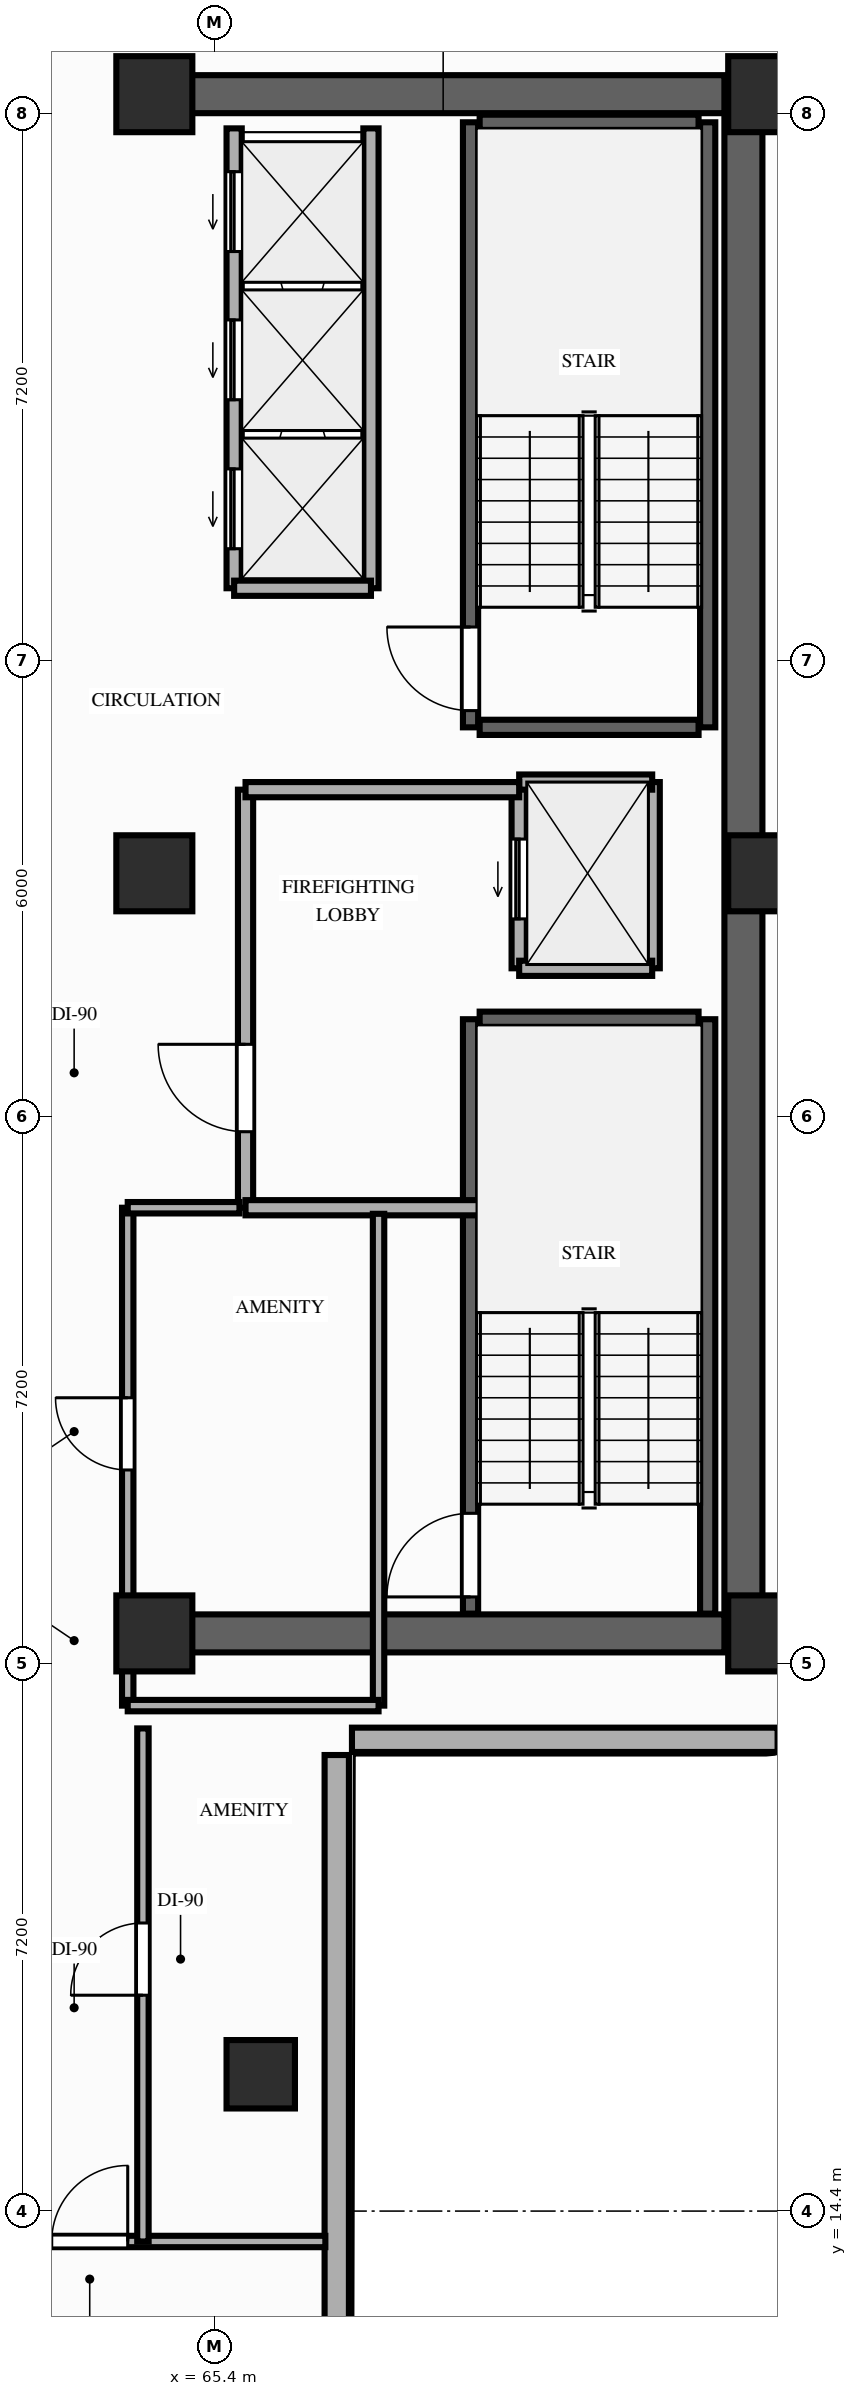
"""IFC4 building model, lengths in metres.
Left out: names, types, materials, properties, quantities, classifications, styles, units other than length and angle.
Written with IfcOpenShell. Run it as: python <this file> out.ifc"""

import sys

from ifc_helpers import new_model, si_unit, direction, frame, frame_2d, origin, origin_2d, place, context, subcontext, project, spatial, rectangle, extrude, element, fill, save


model = new_model("IFC4")
c1 = context("Model", 3, precision=1e-05, world=origin(), true_north=direction((0.0, 1.0)))
c2 = subcontext(c1, "Body", "Model", "MODEL_VIEW")
j1 = project(units=[si_unit("LENGTHUNIT", "METRE"), si_unit("PLANEANGLEUNIT", "RADIAN")], contexts=[c1])
p1 = place(None, origin())
s1 = spatial("IfcSite", under=j1, at=p1, CompositionType="ELEMENT")
p2 = place(p1, origin())
s2 = spatial("IfcBuilding", under=s1, at=p2, CompositionType="ELEMENT")
p3 = place(p2, frame((0.0, 0.0, 62.8)))
s3 = spatial("IfcBuildingStorey", under=s2, at=p3, CompositionType="ELEMENT", Elevation=62.8)
for number, where, z_axis, x_axis in (
    (1, (64.6, 22.0, 0.0), (0.0, 0.0, 1.0), (1.0, 0.0, 0.0)),
    (2, (72.65, 22.0, 0.0), (0.0, 0.0, 1.0), (1.0, 0.0, 0.0)),
    (3, (64.6, 32.0, 0.0), (0.0, 0.0, 1.0), (1.0, 0.0, 0.0)),
    (4, (72.65, 32.0, 0.0), (0.0, 0.0, 1.0), (1.0, 0.0, 0.0)),
    (5, (64.6, 42.25, 0.0), (0.0, 0.0, 1.0), (1.0, 0.0, 0.0)),
    (6, (72.65, 42.25, 0.0), (0.0, 0.0, 1.0), (1.0, 0.0, 0.0)),
):
    element("IfcColumn", number, at=place(p3, frame(where, z_axis=z_axis, x_axis=x_axis)), inside=s3, PredefinedType="COLUMN", context=c2, shape_type="SweptSolid", body=[
        extrude(rectangle(XDim=1.0, YDim=1.0, at=origin_2d()), origin(), (0.0, 0.0, 1.0), 3.2),
    ])
p4 = place(p3, frame((66.0, 16.2, 0.0), z_axis=(0.0, 0.0, 1.0), x_axis=(1.0, 0.0, 0.0)))
e7 = element("IfcColumn", 7, at=p4, inside=s3, PredefinedType="COLUMN", context=c2, shape_type="SweptSolid", body=[
    extrude(rectangle(XDim=0.9, YDim=0.9, at=origin_2d()), origin(), (0.0, 0.0, 1.0), 3.2),
])
p5 = place(p3, frame((67.0, 7.6, 0.0), z_axis=(0.0, 0.0, 1.0), x_axis=(0.0, 1.0, 0.0)))
e8 = element("IfcWall", 8, at=p5, inside=s3, PredefinedType="STANDARD", context=c2, shape_type="SweptSolid", body=[
    extrude(rectangle(XDim=12.8, YDim=0.32, at=frame_2d((6.4, 0.0))), origin(), (0.0, 0.0, 1.0), 3.02),
])
p6 = place(p3, frame((67.2, 20.6, 0.0), z_axis=(0.0, 0.0, 1.0), x_axis=(1.0, 0.0, 0.0)))
e9 = element("IfcWall", 9, at=p6, inside=s3, PredefinedType="STANDARD", context=c2, shape_type="SweptSolid", body=[
    extrude(rectangle(XDim=5.6, YDim=0.32, at=frame_2d((2.8, 0.0))), origin(), (0.0, 0.0, 1.0), 3.02),
])
p7 = place(p3, frame((72.35, 22.0, 0.0), z_axis=(0.0, 0.0, 1.0), x_axis=(0.0, 1.0, 0.0)))
e10 = element("IfcWall", 10, at=p7, inside=s3, PredefinedType="SHEAR", context=c2, shape_type="SweptSolid", body=[
    extrude(rectangle(XDim=20.25, YDim=0.5, at=frame_2d((10.125, 0.0))), origin(), (0.0, 0.0, 1.0), 3.02),
])
for number, where, z_axis, x_axis in (
    (11, (64.6, 42.25, 0.0), (0.0, 0.0, 1.0), (1.0, 0.0, 0.0)),
    (12, (64.6, 22.0, 0.0), (0.0, 0.0, 1.0), (1.0, 0.0, 0.0)),
):
    element("IfcWall", number, at=place(p3, frame(where, z_axis=z_axis, x_axis=x_axis)), inside=s3, PredefinedType="SHEAR", context=c2, shape_type="SweptSolid", body=[
        extrude(rectangle(XDim=7.5, YDim=0.5, at=frame_2d((3.75, 0.0))), origin(), (0.0, 0.0, 1.0), 3.02),
    ])
p8 = place(p3, frame((68.76, 22.26, 0.0), z_axis=(0.0, 0.0, 1.0), x_axis=(0.0, 1.0, 0.0)))
e13 = element("IfcWall", 13, at=p8, inside=s3, PredefinedType="SHEAR", context=c2, shape_type="SweptSolid", body=[
    extrude(rectangle(XDim=7.82, YDim=0.2, at=frame_2d((3.91, 0.0))), origin(), (0.0, 0.0, 1.0), 3.02),
])
p9 = place(p8, frame((0.22, 0.0, 0.0)))
e14 = element("IfcOpeningElement", 14, at=p9, cuts=e13, PredefinedType="OPENING", context=c2, shape_type="SweptSolid", body=[
    extrude(rectangle(XDim=1.1, YDim=2.15, at=frame_2d((0.55, 1.075))), frame((0.0, 0.11, 0.0), z_axis=(0.0, -1.0, 0.0), x_axis=(1.0, 0.0, 0.0)), (0.0, 0.0, 1.0), 0.22),
])
p10 = place(p3, frame((71.88, 22.26, 0.0), z_axis=(0.0, 0.0, 1.0), x_axis=(0.0, 1.0, 0.0)))
e15 = element("IfcWall", 15, at=p10, inside=s3, PredefinedType="SHEAR", context=c2, shape_type="SweptSolid", body=[
    extrude(rectangle(XDim=7.82, YDim=0.2, at=frame_2d((3.91, 0.0))), origin(), (0.0, 0.0, 1.0), 3.02),
])
p11 = place(p3, frame((68.88, 30.08, 0.0), z_axis=(0.0, 0.0, 1.0), x_axis=(1.0, 0.0, 0.0)))
e16 = element("IfcWall", 16, at=p11, inside=s3, PredefinedType="SHEAR", context=c2, shape_type="SweptSolid", body=[
    extrude(rectangle(XDim=2.88, YDim=0.2, at=frame_2d((1.44, 0.0))), origin(), (0.0, 0.0, 1.0), 3.02),
])
p12 = place(p3, frame((68.76, 33.92, 0.0), z_axis=(0.0, 0.0, 1.0), x_axis=(0.0, 1.0, 0.0)))
e17 = element("IfcWall", 17, at=p12, inside=s3, PredefinedType="SHEAR", context=c2, shape_type="SweptSolid", body=[
    extrude(rectangle(XDim=7.96, YDim=0.2, at=frame_2d((3.98, 0.0))), origin(), (0.0, 0.0, 1.0), 3.02),
])
p13 = place(p12, frame((0.22, 0.0, 0.0)))
e18 = element("IfcOpeningElement", 18, at=p13, cuts=e17, PredefinedType="OPENING", context=c2, shape_type="SweptSolid", body=[
    extrude(rectangle(XDim=1.1, YDim=2.15, at=frame_2d((0.55, 1.075))), frame((0.0, 0.11, 0.0), z_axis=(0.0, -1.0, 0.0), x_axis=(1.0, 0.0, 0.0)), (0.0, 0.0, 1.0), 0.22),
])
p14 = place(p3, frame((71.88, 33.92, 0.0), z_axis=(0.0, 0.0, 1.0), x_axis=(0.0, 1.0, 0.0)))
e19 = element("IfcWall", 19, at=p14, inside=s3, PredefinedType="SHEAR", context=c2, shape_type="SweptSolid", body=[
    extrude(rectangle(XDim=7.96, YDim=0.2, at=frame_2d((3.98, 0.0))), origin(), (0.0, 0.0, 1.0), 3.02),
])
for number, where, z_axis, x_axis in (
    (20, (68.88, 41.88, 0.0), (0.0, 0.0, 1.0), (1.0, 0.0, 0.0)),
    (21, (68.88, 33.92, 0.0), (0.0, 0.0, 1.0), (1.0, 0.0, 0.0)),
):
    element("IfcWall", number, at=place(p3, frame(where, z_axis=z_axis, x_axis=x_axis)), inside=s3, PredefinedType="SHEAR", context=c2, shape_type="SweptSolid", body=[
        extrude(rectangle(XDim=2.88, YDim=0.2, at=frame_2d((1.44, 0.0))), origin(), (0.0, 0.0, 1.0), 3.02),
    ])
p15 = place(p3, frame((65.65, 35.75, 0.0), z_axis=(0.0, 0.0, 1.0), x_axis=(0.0, 1.0, 0.0)))
e22 = element("IfcWall", 22, at=p15, inside=s3, PredefinedType="MOVABLE", context=c2, shape_type="SweptSolid", body=[
    extrude(rectangle(XDim=6.05, YDim=0.2, at=frame_2d((3.025, 0.0))), origin(), (0.0, 0.0, 1.0), 3.02),
])
p16 = place(p15, frame((0.52, 0.0, 0.0)))
e23 = element("IfcOpeningElement", 23, at=p16, cuts=e22, PredefinedType="OPENING", context=c2, shape_type="SweptSolid", body=[
    extrude(rectangle(XDim=1.05, YDim=2.15, at=frame_2d((0.525, 1.075))), frame((0.0, 0.11, 0.0), z_axis=(0.0, -1.0, 0.0), x_axis=(1.0, 0.0, 0.0)), (0.0, 0.0, 1.0), 0.22),
])
p17 = place(p15, frame((2.48, 0.0, 0.0)))
e24 = element("IfcOpeningElement", 24, at=p17, cuts=e22, PredefinedType="OPENING", context=c2, shape_type="SweptSolid", body=[
    extrude(rectangle(XDim=1.05, YDim=2.15, at=frame_2d((0.525, 1.075))), frame((0.0, 0.11, 0.0), z_axis=(0.0, -1.0, 0.0), x_axis=(1.0, 0.0, 0.0)), (0.0, 0.0, 1.0), 0.22),
])
p18 = place(p15, frame((4.43, 0.0, 0.0)))
e25 = element("IfcOpeningElement", 25, at=p18, cuts=e22, PredefinedType="OPENING", context=c2, shape_type="SweptSolid", body=[
    extrude(rectangle(XDim=1.05, YDim=2.15, at=frame_2d((0.525, 1.075))), frame((0.0, 0.11, 0.0), z_axis=(0.0, -1.0, 0.0), x_axis=(1.0, 0.0, 0.0)), (0.0, 0.0, 1.0), 0.22),
])
p19 = place(p3, frame((67.45, 35.75, 0.0), z_axis=(0.0, 0.0, 1.0), x_axis=(0.0, 1.0, 0.0)))
e26 = element("IfcWall", 26, at=p19, inside=s3, PredefinedType="MOVABLE", context=c2, shape_type="SweptSolid", body=[
    extrude(rectangle(XDim=6.05, YDim=0.2, at=frame_2d((3.025, 0.0))), origin(), (0.0, 0.0, 1.0), 3.02),
])
p20 = place(p3, frame((65.65, 35.75, 0.0), z_axis=(0.0, 0.0, 1.0), x_axis=(1.0, 0.0, 0.0)))
e27 = element("IfcWall", 27, at=p20, inside=s3, PredefinedType="MOVABLE", context=c2, shape_type="SweptSolid", body=[
    extrude(rectangle(XDim=1.8, YDim=0.2, at=frame_2d((0.9, 0.0))), origin(), (0.0, 0.0, 1.0), 3.02),
])
p21 = place(p3, frame((69.4, 30.75, 0.0), z_axis=(0.0, 0.0, 1.0), x_axis=(0.0, 1.0, 0.0)))
e28 = element("IfcWall", 28, at=p21, inside=s3, PredefinedType="MOVABLE", context=c2, shape_type="SweptSolid", body=[
    extrude(rectangle(XDim=2.45, YDim=0.2, at=frame_2d((1.225, 0.0))), origin(), (0.0, 0.0, 1.0), 3.02),
])
p22 = place(p21, frame((0.65, 0.0, 0.0)))
e29 = element("IfcOpeningElement", 29, at=p22, cuts=e28, PredefinedType="OPENING", context=c2, shape_type="SweptSolid", body=[
    extrude(rectangle(XDim=1.05, YDim=2.15, at=frame_2d((0.525, 1.075))), frame((0.0, 0.11, 0.0), z_axis=(0.0, -1.0, 0.0), x_axis=(1.0, 0.0, 0.0)), (0.0, 0.0, 1.0), 0.22),
])
p23 = place(p3, frame((71.15, 30.75, 0.0), z_axis=(0.0, 0.0, 1.0), x_axis=(0.0, 1.0, 0.0)))
e30 = element("IfcWall", 30, at=p23, inside=s3, PredefinedType="MOVABLE", context=c2, shape_type="SweptSolid", body=[
    extrude(rectangle(XDim=2.45, YDim=0.2, at=frame_2d((1.225, 0.0))), origin(), (0.0, 0.0, 1.0), 3.02),
])
for number, where, z_axis, x_axis in (
    (31, (69.4, 33.2, 0.0), (0.0, 0.0, 1.0), (1.0, 0.0, 0.0)),
    (32, (69.4, 30.75, 0.0), (0.0, 0.0, 1.0), (1.0, 0.0, 0.0)),
):
    element("IfcWall", number, at=place(p3, frame(where, z_axis=z_axis, x_axis=x_axis)), inside=s3, PredefinedType="MOVABLE", context=c2, shape_type="SweptSolid", body=[
        extrude(rectangle(XDim=1.75, YDim=0.2, at=frame_2d((0.875, 0.0))), origin(), (0.0, 0.0, 1.0), 3.02),
    ])
p24 = place(p3, frame((65.8, 27.6, 0.0), z_axis=(0.0, 0.0, 1.0), x_axis=(0.0, 1.0, 0.0)))
e33 = element("IfcWall", 33, at=p24, inside=s3, PredefinedType="PARTITIONING", context=c2, shape_type="SweptSolid", body=[
    extrude(rectangle(XDim=5.5, YDim=0.2, at=frame_2d((2.75, 0.0))), origin(), (0.0, 0.0, 1.0), 3.02),
])
p25 = place(p24, frame((1.0, 0.0, 0.0)))
e34 = element("IfcOpeningElement", 34, at=p25, cuts=e33, PredefinedType="OPENING", context=c2, shape_type="SweptSolid", body=[
    extrude(rectangle(XDim=1.15, YDim=2.15, at=frame_2d((0.575, 1.075))), frame((0.0, 0.11, 0.0), z_axis=(0.0, -1.0, 0.0), x_axis=(1.0, 0.0, 0.0)), (0.0, 0.0, 1.0), 0.22),
])
p26 = place(p3, frame((65.8, 33.1, 0.0), z_axis=(0.0, 0.0, 1.0), x_axis=(1.0, 0.0, 0.0)))
e35 = element("IfcWall", 35, at=p26, inside=s3, PredefinedType="PARTITIONING", context=c2, shape_type="SweptSolid", body=[
    extrude(rectangle(XDim=3.6, YDim=0.2, at=frame_2d((1.8, 0.0))), origin(), (0.0, 0.0, 1.0), 3.02),
])
p27 = place(p3, frame((65.8, 27.6, 0.0), z_axis=(0.0, 0.0, 1.0), x_axis=(1.0, 0.0, 0.0)))
e36 = element("IfcWall", 36, at=p27, inside=s3, PredefinedType="PARTITIONING", context=c2, shape_type="SweptSolid", body=[
    extrude(rectangle(XDim=3.4, YDim=0.2, at=frame_2d((1.7, 0.0))), origin(), (0.0, 0.0, 1.0), 3.02),
])
p28 = place(p3, frame((64.25, 21.05, 0.0), z_axis=(0.0, 0.0, 1.0), x_axis=(0.0, 1.0, 0.0)))
e37 = element("IfcWall", 37, at=p28, inside=s3, PredefinedType="PARTITIONING", context=c2, shape_type="SweptSolid", body=[
    extrude(rectangle(XDim=6.55, YDim=0.15, at=frame_2d((3.275, 0.0))), origin(), (0.0, 0.0, 1.0), 2.5),
])
p29 = place(p28, frame((3.1, 0.0, 0.0)))
e38 = element("IfcOpeningElement", 38, at=p29, cuts=e37, PredefinedType="OPENING", context=c2, shape_type="SweptSolid", body=[
    extrude(rectangle(XDim=0.95, YDim=2.15, at=frame_2d((0.475, 1.075))), frame((0.0, 0.085, 0.0), z_axis=(0.0, -1.0, 0.0), x_axis=(1.0, 0.0, 0.0)), (0.0, 0.0, 1.0), 0.17),
])
p30 = place(p3, frame((67.55, 21.05, 0.0), z_axis=(0.0, 0.0, 1.0), x_axis=(0.0, 1.0, 0.0)))
e39 = element("IfcWall", 39, at=p30, inside=s3, PredefinedType="PARTITIONING", context=c2, shape_type="SweptSolid", body=[
    extrude(rectangle(XDim=6.47, YDim=0.15, at=frame_2d((3.235, 0.0))), origin(), (0.0, 0.0, 1.0), 2.5),
])
p31 = place(p3, frame((64.25, 21.05, 0.0), z_axis=(0.0, 0.0, 1.0), x_axis=(1.0, 0.0, 0.0)))
e40 = element("IfcWall", 40, at=p31, inside=s3, PredefinedType="PARTITIONING", context=c2, shape_type="SweptSolid", body=[
    extrude(rectangle(XDim=3.3, YDim=0.15, at=frame_2d((1.65, 0.0))), origin(), (0.0, 0.0, 1.0), 2.5),
])
p32 = place(p3, frame((64.25, 27.6, 0.0), z_axis=(0.0, 0.0, 1.0), x_axis=(1.0, 0.0, 0.0)))
e41 = element("IfcWall", 41, at=p32, inside=s3, PredefinedType="PARTITIONING", context=c2, shape_type="SweptSolid", body=[
    extrude(rectangle(XDim=1.47, YDim=0.15, at=frame_2d((0.735, 0.0))), origin(), (0.0, 0.0, 1.0), 2.5),
])
p33 = place(p3, frame((55.55, 14.0, 0.0), z_axis=(0.0, 0.0, 1.0), x_axis=(1.0, 0.0, 0.0)))
e42 = element("IfcWall", 42, at=p33, inside=s3, PredefinedType="PARTITIONING", context=c2, shape_type="SweptSolid", body=[
    extrude(rectangle(XDim=11.3, YDim=0.15, at=frame_2d((5.65, 0.0))), origin(), (0.0, 0.0, 1.0), 2.5),
])
p34 = place(p33, frame((7.7, 0.0, 0.0)))
e43 = element("IfcOpeningElement", 43, at=p34, cuts=e42, PredefinedType="OPENING", context=c2, shape_type="SweptSolid", body=[
    extrude(rectangle(XDim=1.0, YDim=2.15, at=frame_2d((0.5, 1.075))), frame((0.0, 0.085, 0.0), z_axis=(0.0, -1.0, 0.0), x_axis=(1.0, 0.0, 0.0)), (0.0, 0.0, 1.0), 0.17),
])
p35 = place(p3, frame((64.45, 14.0, 0.0), z_axis=(0.0, 0.0, 1.0), x_axis=(0.0, 1.0, 0.0)))
e44 = element("IfcWall", 44, at=p35, inside=s3, PredefinedType="PARTITIONING", context=c2, shape_type="SweptSolid", body=[
    extrude(rectangle(XDim=6.75, YDim=0.15, at=frame_2d((3.375, 0.0))), origin(), (0.0, 0.0, 1.0), 2.5),
])
p36 = place(p35, frame((3.24, 0.0, 0.0)))
e45 = element("IfcOpeningElement", 45, at=p36, cuts=e44, PredefinedType="OPENING", context=c2, shape_type="SweptSolid", body=[
    extrude(rectangle(XDim=0.95, YDim=2.15, at=frame_2d((0.475, 1.075))), frame((0.0, 0.085, 0.0), z_axis=(0.0, -1.0, 0.0), x_axis=(1.0, 0.0, 0.0)), (0.0, 0.0, 1.0), 0.17),
])
p37 = place(p9, origin())
e46 = element("IfcDoor", 46, at=p37, inside=s3, OperationType="SINGLE_SWING_LEFT", PredefinedType="DOOR", context=c2, shape_type="SweptSolid", body=[
    extrude(rectangle(XDim=1.1, YDim=2.15, at=frame_2d((0.55, 1.075))), frame((0.0, 0.025, 0.0), z_axis=(0.0, -1.0, 0.0), x_axis=(1.0, 0.0, 0.0)), (0.0, 0.0, 1.0), 0.05),
])
fill(e14, e46)
p38 = place(p13, origin())
e47 = element("IfcDoor", 47, at=p38, inside=s3, OperationType="SINGLE_SWING_RIGHT", PredefinedType="DOOR", context=c2, shape_type="SweptSolid", body=[
    extrude(rectangle(XDim=1.1, YDim=2.15, at=frame_2d((0.55, 1.075))), frame((0.0, 0.025, 0.0), z_axis=(0.0, -1.0, 0.0), x_axis=(1.0, 0.0, 0.0)), (0.0, 0.0, 1.0), 0.05),
])
fill(e18, e47)
p39 = place(p16, origin())
e48 = element("IfcDoor", 48, at=p39, inside=s3, OperationType="SLIDING_TO_LEFT", PredefinedType="DOOR", context=c2, shape_type="SweptSolid", body=[
    extrude(rectangle(XDim=1.05, YDim=2.15, at=frame_2d((0.525, 1.075))), frame((0.0, 0.025, 0.0), z_axis=(0.0, -1.0, 0.0), x_axis=(1.0, 0.0, 0.0)), (0.0, 0.0, 1.0), 0.05),
])
fill(e23, e48)
p40 = place(p17, origin())
e49 = element("IfcDoor", 49, at=p40, inside=s3, OperationType="SLIDING_TO_LEFT", PredefinedType="DOOR", context=c2, shape_type="SweptSolid", body=[
    extrude(rectangle(XDim=1.05, YDim=2.15, at=frame_2d((0.525, 1.075))), frame((0.0, 0.025, 0.0), z_axis=(0.0, -1.0, 0.0), x_axis=(1.0, 0.0, 0.0)), (0.0, 0.0, 1.0), 0.05),
])
fill(e24, e49)
p41 = place(p18, origin())
e50 = element("IfcDoor", 50, at=p41, inside=s3, OperationType="SLIDING_TO_LEFT", PredefinedType="DOOR", context=c2, shape_type="SweptSolid", body=[
    extrude(rectangle(XDim=1.05, YDim=2.15, at=frame_2d((0.525, 1.075))), frame((0.0, 0.025, 0.0), z_axis=(0.0, -1.0, 0.0), x_axis=(1.0, 0.0, 0.0)), (0.0, 0.0, 1.0), 0.05),
])
fill(e25, e50)
p42 = place(p22, origin())
e51 = element("IfcDoor", 51, at=p42, inside=s3, OperationType="SLIDING_TO_LEFT", PredefinedType="DOOR", context=c2, shape_type="SweptSolid", body=[
    extrude(rectangle(XDim=1.05, YDim=2.15, at=frame_2d((0.525, 1.075))), frame((0.0, 0.025, 0.0), z_axis=(0.0, -1.0, 0.0), x_axis=(1.0, 0.0, 0.0)), (0.0, 0.0, 1.0), 0.05),
])
fill(e29, e51)
p43 = place(p25, origin())
e52 = element("IfcDoor", 52, at=p43, inside=s3, OperationType="SINGLE_SWING_RIGHT", PredefinedType="DOOR", context=c2, shape_type="SweptSolid", body=[
    extrude(rectangle(XDim=1.15, YDim=2.15, at=frame_2d((0.575, 1.075))), frame((0.0, 0.025, 0.0), z_axis=(0.0, -1.0, 0.0), x_axis=(1.0, 0.0, 0.0)), (0.0, 0.0, 1.0), 0.05),
])
fill(e34, e52)
p44 = place(p29, origin())
e53 = element("IfcDoor", 53, at=p44, inside=s3, OperationType="SINGLE_SWING_RIGHT", PredefinedType="DOOR", context=c2, shape_type="SweptSolid", body=[
    extrude(rectangle(XDim=0.95, YDim=2.15, at=frame_2d((0.475, 1.075))), frame((0.0, 0.025, 0.0), z_axis=(0.0, -1.0, 0.0), x_axis=(1.0, 0.0, 0.0)), (0.0, 0.0, 1.0), 0.05),
])
fill(e38, e53)
p45 = place(p36, origin())
e54 = element("IfcDoor", 54, at=p45, inside=s3, OperationType="SINGLE_SWING_LEFT", PredefinedType="DOOR", context=c2, shape_type="SweptSolid", body=[
    extrude(rectangle(XDim=0.95, YDim=2.15, at=frame_2d((0.475, 1.075))), frame((0.0, 0.025, 0.0), z_axis=(0.0, -1.0, 0.0), x_axis=(1.0, 0.0, 0.0)), (0.0, 0.0, 1.0), 0.05),
])
fill(e45, e54)
p46 = place(p34, origin())
e55 = element("IfcDoor", 55, at=p46, inside=s3, OperationType="SINGLE_SWING_RIGHT", PredefinedType="DOOR", context=c2, shape_type="SweptSolid", body=[
    extrude(rectangle(XDim=1.0, YDim=2.15, at=frame_2d((0.5, 1.075))), frame((0.0, 0.025, 0.0), z_axis=(0.0, -1.0, 0.0), x_axis=(1.0, 0.0, 0.0)), (0.0, 0.0, 1.0), 0.05),
])
fill(e43, e55)
save(model, sys.argv[1])
